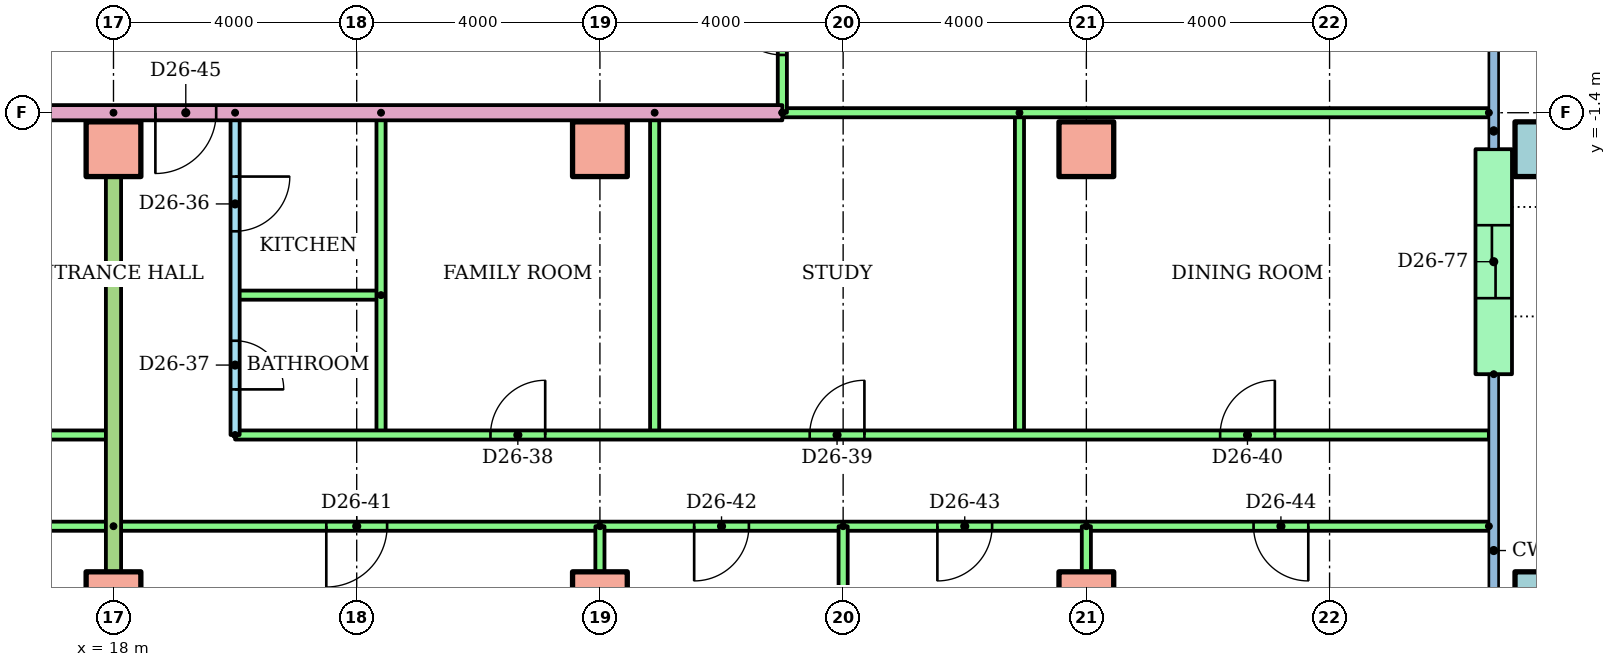
"""IFC4 building model, lengths in metres.
Left out: names, types, materials, properties, quantities, classifications, styles, units other than length and angle.
Written with IfcOpenShell. Run it as: python <this file> out.ifc"""

import sys

from ifc_helpers import new_model, si_unit, direction, frame, frame_2d, origin, origin_2d, place, context, subcontext, project, spatial, rectangle, hollow_rectangle, extrude, element, fill, save


model = new_model("IFC4")
c1 = context("Model", 3, precision=1e-05, world=origin(), true_north=direction((0.0, 1.0)))
c2 = subcontext(c1, "Body", "Model", "MODEL_VIEW")
j1 = project(units=[si_unit("LENGTHUNIT", "METRE"), si_unit("PLANEANGLEUNIT", "RADIAN")], contexts=[c1])
p1 = place(None, origin())
s1 = spatial("IfcSite", under=j1, at=p1, CompositionType="ELEMENT")
p2 = place(p1, origin())
s2 = spatial("IfcBuilding", under=s1, at=p2, CompositionType="ELEMENT")
p3 = place(p2, frame((0.0, 0.0, 99.9)))
s3 = spatial("IfcBuildingStorey", under=s2, at=p3, CompositionType="ELEMENT", Elevation=99.9)
for number, where in (
    (1, (18.0, -9.4, 0.0)),
    (2, (26.0, -9.4, 0.0)),
    (3, (34.0, -9.4, 0.0)),
):
    element("IfcColumn", number, at=place(p3, frame(where)), inside=s3, PredefinedType="COLUMN", context=c2, shape_type="SweptSolid", body=[
        extrude(rectangle(XDim=0.9, YDim=0.9, at=origin_2d()), origin(), (0.0, 0.0, 1.0), 3.2),
    ])
p4 = place(p3, frame((41.5, -9.4, 0.0)))
e4 = element("IfcColumn", 4, at=p4, inside=s3, PredefinedType="COLUMN", context=c2, shape_type="SweptSolid", body=[
    extrude(hollow_rectangle(XDim=0.9, YDim=0.9, WallThickness=0.045, at=origin_2d()), origin(), (0.0, 0.0, 1.0), 3.2),
])
for number, where in (
    (5, (18.0, -2.0, 0.0)),
    (6, (26.0, -2.0, 0.0)),
    (7, (34.0, -2.0, 0.0)),
):
    element("IfcColumn", number, at=place(p3, frame(where)), inside=s3, PredefinedType="COLUMN", context=c2, shape_type="SweptSolid", body=[
        extrude(rectangle(XDim=0.9, YDim=0.9, at=origin_2d()), origin(), (0.0, 0.0, 1.0), 3.2),
    ])
p5 = place(p3, frame((41.5, -2.0, 0.0)))
e8 = element("IfcColumn", 8, at=p5, inside=s3, PredefinedType="COLUMN", context=c2, shape_type="SweptSolid", body=[
    extrude(hollow_rectangle(XDim=0.9, YDim=0.9, WallThickness=0.045, at=origin_2d()), origin(), (0.0, 0.0, 1.0), 3.2),
])
p6 = place(p3, frame((40.7, -5.7, 0.0), z_axis=(0.0, 0.0, 1.0), x_axis=(0.0, 1.0, 0.0)))
e9 = element("IfcWall", 9, at=p6, inside=s3, PredefinedType="STANDARD", context=c2, shape_type="SweptSolid", body=[
    extrude(rectangle(XDim=3.7, YDim=0.6, at=frame_2d((1.85, 0.0))), origin(), (0.0, 0.0, 1.0), 2.92),
])
p7 = place(p6, frame((1.25, 0.0, 0.0)))
e10 = element("IfcOpeningElement", 10, at=p7, cuts=e9, PredefinedType="OPENING", context=c2, shape_type="SweptSolid", body=[
    extrude(rectangle(XDim=1.2, YDim=2.1, at=frame_2d((0.6, 1.05))), frame((0.0, 0.31, 0.0), z_axis=(0.0, -1.0, 0.0), x_axis=(1.0, 0.0, 0.0)), (0.0, 0.0, 1.0), 0.62),
])
p8 = place(p3, frame((-4.0, -6.7, 0.0)))
e11 = element("IfcWall", 11, at=p8, inside=s3, PredefinedType="PARTITIONING", context=c2, shape_type="SweptSolid", body=[
    extrude(rectangle(XDim=22.0, YDim=0.15, at=frame_2d((11.0, 0.0))), origin(), (0.0, 0.0, 1.0), 2.4),
])
p9 = place(p8, frame((4.45, 0.0, 0.0)))
e12 = element("IfcOpeningElement", 12, at=p9, cuts=e11, PredefinedType="OPENING", context=c2, shape_type="SweptSolid", body=[
    extrude(rectangle(XDim=0.9, YDim=2.1, at=frame_2d((0.45, 1.05))), frame((0.0, 0.085, 0.0), z_axis=(0.0, -1.0, 0.0), x_axis=(1.0, 0.0, 0.0)), (0.0, 0.0, 1.0), 0.17),
])
p10 = place(p8, frame((10.2, 0.0, 0.0)))
e13 = element("IfcOpeningElement", 13, at=p10, cuts=e11, PredefinedType="OPENING", context=c2, shape_type="SweptSolid", body=[
    extrude(rectangle(XDim=0.9, YDim=2.1, at=frame_2d((0.45, 1.05))), frame((0.0, 0.085, 0.0), z_axis=(0.0, -1.0, 0.0), x_axis=(1.0, 0.0, 0.0)), (0.0, 0.0, 1.0), 0.17),
])
p11 = place(p8, frame((17.5, 0.0, 0.0)))
e14 = element("IfcOpeningElement", 14, at=p11, cuts=e11, PredefinedType="OPENING", context=c2, shape_type="SweptSolid", body=[
    extrude(rectangle(XDim=0.9, YDim=2.1, at=frame_2d((0.45, 1.05))), frame((0.0, 0.085, 0.0), z_axis=(0.0, -1.0, 0.0), x_axis=(1.0, 0.0, 0.0)), (0.0, 0.0, 1.0), 0.17),
])
p12 = place(p3, frame((18.0, -8.2, 0.0), z_axis=(0.0, 0.0, 1.0), x_axis=(-1.0, 0.0, 0.0)))
e15 = element("IfcWall", 15, at=p12, inside=s3, PredefinedType="PARTITIONING", context=c2, shape_type="SweptSolid", body=[
    extrude(rectangle(XDim=24.0, YDim=0.15, at=frame_2d((12.0, 0.0))), origin(), (0.0, 0.0, 1.0), 2.4),
])
p13 = place(p12, frame((21.55, 0.0, 0.0)))
e16 = element("IfcOpeningElement", 16, at=p13, cuts=e15, PredefinedType="OPENING", context=c2, shape_type="SweptSolid", body=[
    extrude(rectangle(XDim=0.9, YDim=2.1, at=frame_2d((0.45, 1.05))), frame((0.0, 0.085, 0.0), z_axis=(0.0, -1.0, 0.0), x_axis=(1.0, 0.0, 0.0)), (0.0, 0.0, 1.0), 0.17),
])
p14 = place(p12, frame((17.55, 0.0, 0.0)))
e17 = element("IfcOpeningElement", 17, at=p14, cuts=e15, PredefinedType="OPENING", context=c2, shape_type="SweptSolid", body=[
    extrude(rectangle(XDim=0.9, YDim=2.1, at=frame_2d((0.45, 1.05))), frame((0.0, 0.085, 0.0), z_axis=(0.0, -1.0, 0.0), x_axis=(1.0, 0.0, 0.0)), (0.0, 0.0, 1.0), 0.17),
])
p15 = place(p12, frame((13.55, 0.0, 0.0)))
e18 = element("IfcOpeningElement", 18, at=p15, cuts=e15, PredefinedType="OPENING", context=c2, shape_type="SweptSolid", body=[
    extrude(rectangle(XDim=0.9, YDim=2.1, at=frame_2d((0.45, 1.05))), frame((0.0, 0.085, 0.0), z_axis=(0.0, -1.0, 0.0), x_axis=(1.0, 0.0, 0.0)), (0.0, 0.0, 1.0), 0.17),
])
p16 = place(p12, frame((9.55, 0.0, 0.0)))
e19 = element("IfcOpeningElement", 19, at=p16, cuts=e15, PredefinedType="OPENING", context=c2, shape_type="SweptSolid", body=[
    extrude(rectangle(XDim=0.9, YDim=2.1, at=frame_2d((0.45, 1.05))), frame((0.0, 0.085, 0.0), z_axis=(0.0, -1.0, 0.0), x_axis=(1.0, 0.0, 0.0)), (0.0, 0.0, 1.0), 0.17),
])
p17 = place(p12, frame((3.5, 0.0, 0.0)))
e20 = element("IfcOpeningElement", 20, at=p17, cuts=e15, PredefinedType="OPENING", context=c2, shape_type="SweptSolid", body=[
    extrude(rectangle(XDim=1.0, YDim=2.1, at=frame_2d((0.5, 1.05))), frame((0.0, 0.085, 0.0), z_axis=(0.0, -1.0, 0.0), x_axis=(1.0, 0.0, 0.0)), (0.0, 0.0, 1.0), 0.17),
])
p18 = place(p3, frame((20.0, -1.4, 0.0), z_axis=(0.0, 0.0, 1.0), x_axis=(0.0, -1.0, 0.0)))
e21 = element("IfcWall", 21, at=p18, inside=s3, PredefinedType="PARTITIONING", context=c2, shape_type="SweptSolid", body=[
    extrude(rectangle(XDim=5.3, YDim=0.15, at=frame_2d((2.65, 0.0))), origin(), (0.0, 0.0, 1.0), 2.4),
])
p19 = place(p18, frame((1.05, 0.0, 0.0)))
e22 = element("IfcOpeningElement", 22, at=p19, cuts=e21, PredefinedType="OPENING", context=c2, shape_type="SweptSolid", body=[
    extrude(rectangle(XDim=0.9, YDim=2.1, at=frame_2d((0.45, 1.05))), frame((0.0, 0.085, 0.0), z_axis=(0.0, -1.0, 0.0), x_axis=(1.0, 0.0, 0.0)), (0.0, 0.0, 1.0), 0.17),
])
p20 = place(p18, frame((3.75, 0.0, 0.0)))
e23 = element("IfcOpeningElement", 23, at=p20, cuts=e21, PredefinedType="OPENING", context=c2, shape_type="SweptSolid", body=[
    extrude(rectangle(XDim=0.8, YDim=2.1, at=frame_2d((0.4, 1.05))), frame((0.0, 0.085, 0.0), z_axis=(0.0, -1.0, 0.0), x_axis=(1.0, 0.0, 0.0)), (0.0, 0.0, 1.0), 0.17),
])
p21 = place(p3, frame((22.4, -4.4, 0.0), z_axis=(0.0, 0.0, 1.0), x_axis=(-1.0, 0.0, 0.0)))
e24 = element("IfcWall", 24, at=p21, inside=s3, PredefinedType="PARTITIONING", context=c2, shape_type="SweptSolid", body=[
    extrude(rectangle(XDim=2.4, YDim=0.15, at=frame_2d((1.2, 0.0))), origin(), (0.0, 0.0, 1.0), 2.4),
])
for number, where, z_axis, x_axis in (
    (25, (22.4, -1.4, 0.0), (0.0, 0.0, 1.0), (0.0, -1.0, 0.0)),
    (26, (26.9, -1.4, 0.0), (0.0, 0.0, 1.0), (0.0, -1.0, 0.0)),
    (27, (32.9, -1.4, 0.0), (0.0, 0.0, 1.0), (0.0, -1.0, 0.0)),
):
    element("IfcWall", number, at=place(p3, frame(where, z_axis=z_axis, x_axis=x_axis)), inside=s3, PredefinedType="PARTITIONING", context=c2, shape_type="SweptSolid", body=[
        extrude(rectangle(XDim=5.3, YDim=0.15, at=frame_2d((2.65, 0.0))), origin(), (0.0, 0.0, 1.0), 2.4),
    ])
p22 = place(p3, frame((20.0, -6.7, 0.0)))
e28 = element("IfcWall", 28, at=p22, inside=s3, PredefinedType="PARTITIONING", context=c2, shape_type="SweptSolid", body=[
    extrude(rectangle(XDim=20.62, YDim=0.15, at=frame_2d((10.31, 0.0))), origin(), (0.0, 0.0, 1.0), 2.4),
])
p23 = place(p22, frame((4.2, 0.0, 0.0)))
e29 = element("IfcOpeningElement", 29, at=p23, cuts=e28, PredefinedType="OPENING", context=c2, shape_type="SweptSolid", body=[
    extrude(rectangle(XDim=0.9, YDim=2.1, at=frame_2d((0.45, 1.05))), frame((0.0, 0.085, 0.0), z_axis=(0.0, -1.0, 0.0), x_axis=(1.0, 0.0, 0.0)), (0.0, 0.0, 1.0), 0.17),
])
p24 = place(p22, frame((9.45, 0.0, 0.0)))
e30 = element("IfcOpeningElement", 30, at=p24, cuts=e28, PredefinedType="OPENING", context=c2, shape_type="SweptSolid", body=[
    extrude(rectangle(XDim=0.9, YDim=2.1, at=frame_2d((0.45, 1.05))), frame((0.0, 0.085, 0.0), z_axis=(0.0, -1.0, 0.0), x_axis=(1.0, 0.0, 0.0)), (0.0, 0.0, 1.0), 0.17),
])
p25 = place(p22, frame((16.2, 0.0, 0.0)))
e31 = element("IfcOpeningElement", 31, at=p25, cuts=e28, PredefinedType="OPENING", context=c2, shape_type="SweptSolid", body=[
    extrude(rectangle(XDim=0.9, YDim=2.1, at=frame_2d((0.45, 1.05))), frame((0.0, 0.085, 0.0), z_axis=(0.0, -1.0, 0.0), x_axis=(1.0, 0.0, 0.0)), (0.0, 0.0, 1.0), 0.17),
])
p26 = place(p3, frame((40.62, -8.2, 0.0), z_axis=(0.0, 0.0, 1.0), x_axis=(-1.0, 0.0, 0.0)))
e32 = element("IfcWall", 32, at=p26, inside=s3, PredefinedType="PARTITIONING", context=c2, shape_type="SweptSolid", body=[
    extrude(rectangle(XDim=22.62, YDim=0.15, at=frame_2d((11.31, 0.0))), origin(), (0.0, 0.0, 1.0), 2.4),
])
p27 = place(p26, frame((18.12, 0.0, 0.0)))
e33 = element("IfcOpeningElement", 33, at=p27, cuts=e32, PredefinedType="OPENING", context=c2, shape_type="SweptSolid", body=[
    extrude(rectangle(XDim=1.0, YDim=2.1, at=frame_2d((0.5, 1.05))), frame((0.0, 0.085, 0.0), z_axis=(0.0, -1.0, 0.0), x_axis=(1.0, 0.0, 0.0)), (0.0, 0.0, 1.0), 0.17),
])
p28 = place(p26, frame((12.17, 0.0, 0.0)))
e34 = element("IfcOpeningElement", 34, at=p28, cuts=e32, PredefinedType="OPENING", context=c2, shape_type="SweptSolid", body=[
    extrude(rectangle(XDim=0.9, YDim=2.1, at=frame_2d((0.45, 1.05))), frame((0.0, 0.085, 0.0), z_axis=(0.0, -1.0, 0.0), x_axis=(1.0, 0.0, 0.0)), (0.0, 0.0, 1.0), 0.17),
])
p29 = place(p26, frame((8.17, 0.0, 0.0)))
e35 = element("IfcOpeningElement", 35, at=p29, cuts=e32, PredefinedType="OPENING", context=c2, shape_type="SweptSolid", body=[
    extrude(rectangle(XDim=0.9, YDim=2.1, at=frame_2d((0.45, 1.05))), frame((0.0, 0.085, 0.0), z_axis=(0.0, -1.0, 0.0), x_axis=(1.0, 0.0, 0.0)), (0.0, 0.0, 1.0), 0.17),
])
p30 = place(p26, frame((2.97, 0.0, 0.0)))
e36 = element("IfcOpeningElement", 36, at=p30, cuts=e32, PredefinedType="OPENING", context=c2, shape_type="SweptSolid", body=[
    extrude(rectangle(XDim=0.9, YDim=2.1, at=frame_2d((0.45, 1.05))), frame((0.0, 0.085, 0.0), z_axis=(0.0, -1.0, 0.0), x_axis=(1.0, 0.0, 0.0)), (0.0, 0.0, 1.0), 0.17),
])
p31 = place(p3, frame((26.0, -8.2, 0.0), z_axis=(0.0, 0.0, 1.0), x_axis=(0.0, -1.0, 0.0)))
e37 = element("IfcWall", 37, at=p31, inside=s3, PredefinedType="PARTITIONING", context=c2, shape_type="SweptSolid", body=[
    extrude(rectangle(XDim=8.01, YDim=0.15, at=frame_2d((4.005, 0.0))), origin(), (0.0, 0.0, 1.0), 2.4),
])
p32 = place(p3, frame((30.0, -8.2, 0.0), z_axis=(0.0, 0.0, 1.0), x_axis=(0.0, -1.0, 0.0)))
e38 = element("IfcWall", 38, at=p32, inside=s3, PredefinedType="PARTITIONING", context=c2, shape_type="SweptSolid", body=[
    extrude(rectangle(XDim=8.021, YDim=0.15, at=frame_2d((4.01, 0.0))), origin(), (0.0, 0.0, 1.0), 2.4),
])
p33 = place(p3, frame((34.0, -8.2, 0.0), z_axis=(0.0, 0.0, 1.0), x_axis=(0.0, -1.0, 0.0)))
e39 = element("IfcWall", 39, at=p33, inside=s3, PredefinedType="PARTITIONING", context=c2, shape_type="SweptSolid", body=[
    extrude(rectangle(XDim=8.01, YDim=0.15, at=frame_2d((4.005, 0.0))), origin(), (0.0, 0.0, 1.0), 2.4),
])
p34 = place(p3, frame((18.0, -1.4, 0.0), z_axis=(0.0, 0.0, 1.0), x_axis=(0.0, -1.0, 0.0)))
e40 = element("IfcWall", 40, at=p34, inside=s3, PredefinedType="PARTITIONING", context=c2, shape_type="SweptSolid", body=[
    extrude(rectangle(XDim=14.81, YDim=0.25, at=frame_2d((7.405, 0.0))), origin(), (0.0, 0.0, 1.0), 2.4),
])
p35 = place(p3, frame((29.0, -1.4, 0.0), z_axis=(0.0, 0.0, 1.0), x_axis=(-1.0, 0.0, 0.0)))
e41 = element("IfcWall", 41, at=p35, inside=s3, PredefinedType="PARTITIONING", context=c2, shape_type="SweptSolid", body=[
    extrude(rectangle(XDim=15.0, YDim=0.25, at=frame_2d((7.5, 0.0))), origin(), (0.0, 0.0, 1.0), 2.4),
])
p36 = place(p35, frame((9.311, 0.0, 0.0)))
e42 = element("IfcOpeningElement", 42, at=p36, cuts=e41, PredefinedType="OPENING", context=c2, shape_type="SweptSolid", body=[
    extrude(rectangle(XDim=1.0, YDim=2.1, at=frame_2d((0.5, 1.05))), frame((0.0, 0.135, 0.0), z_axis=(0.0, -1.0, 0.0), x_axis=(1.0, 0.0, 0.0)), (0.0, 0.0, 1.0), 0.27),
])
p37 = place(p3, frame((40.62, -1.4, 0.0), z_axis=(0.0, 0.0, 1.0), x_axis=(-1.0, 0.0, 0.0)))
e43 = element("IfcWall", 43, at=p37, inside=s3, PredefinedType="PARTITIONING", context=c2, shape_type="SweptSolid", body=[
    extrude(rectangle(XDim=11.62, YDim=0.15, at=frame_2d((5.81, 0.0))), origin(), (0.0, 0.0, 1.0), 2.4),
])
p38 = place(p3, frame((29.0, -1.4, 0.0), z_axis=(0.0, 0.0, 1.0), x_axis=(0.0, 1.0, 0.0)))
e44 = element("IfcWall", 44, at=p38, inside=s3, PredefinedType="PARTITIONING", context=c2, shape_type="SweptSolid", body=[
    extrude(rectangle(XDim=2.8, YDim=0.15, at=frame_2d((1.4, 0.0))), origin(), (0.0, 0.0, 1.0), 2.4),
])
p39 = place(p38, frame((0.95, 0.0, 0.0)))
e45 = element("IfcOpeningElement", 45, at=p39, cuts=e44, PredefinedType="OPENING", context=c2, shape_type="SweptSolid", body=[
    extrude(rectangle(XDim=0.9, YDim=2.1, at=frame_2d((0.45, 1.05))), frame((0.0, 0.085, 0.0), z_axis=(0.0, -1.0, 0.0), x_axis=(1.0, 0.0, 0.0)), (0.0, 0.0, 1.0), 0.17),
])
p40 = place(p19, origin())
e46 = element("IfcDoor", 46, at=p40, inside=s3, OperationType="SINGLE_SWING_LEFT", PredefinedType="DOOR", context=c2, shape_type="SweptSolid", body=[
    extrude(rectangle(XDim=0.9, YDim=2.1, at=frame_2d((0.45, 1.05))), frame((0.0, 0.025, 0.0), z_axis=(0.0, -1.0, 0.0), x_axis=(1.0, 0.0, 0.0)), (0.0, 0.0, 1.0), 0.05),
])
fill(e22, e46)
p41 = place(p20, origin())
e47 = element("IfcDoor", 47, at=p41, inside=s3, OperationType="SINGLE_SWING_RIGHT", PredefinedType="DOOR", context=c2, shape_type="SweptSolid", body=[
    extrude(rectangle(XDim=0.8, YDim=2.1, at=frame_2d((0.4, 1.05))), frame((0.0, 0.025, 0.0), z_axis=(0.0, -1.0, 0.0), x_axis=(1.0, 0.0, 0.0)), (0.0, 0.0, 1.0), 0.05),
])
fill(e23, e47)
p42 = place(p23, origin())
e48 = element("IfcDoor", 48, at=p42, inside=s3, OperationType="SINGLE_SWING_RIGHT", PredefinedType="DOOR", context=c2, shape_type="SweptSolid", body=[
    extrude(rectangle(XDim=0.9, YDim=2.1, at=frame_2d((0.45, 1.05))), frame((0.0, 0.025, 0.0), z_axis=(0.0, -1.0, 0.0), x_axis=(1.0, 0.0, 0.0)), (0.0, 0.0, 1.0), 0.05),
])
fill(e29, e48)
p43 = place(p24, origin())
e49 = element("IfcDoor", 49, at=p43, inside=s3, OperationType="SINGLE_SWING_RIGHT", PredefinedType="DOOR", context=c2, shape_type="SweptSolid", body=[
    extrude(rectangle(XDim=0.9, YDim=2.1, at=frame_2d((0.45, 1.05))), frame((0.0, 0.025, 0.0), z_axis=(0.0, -1.0, 0.0), x_axis=(1.0, 0.0, 0.0)), (0.0, 0.0, 1.0), 0.05),
])
fill(e30, e49)
p44 = place(p25, origin())
e50 = element("IfcDoor", 50, at=p44, inside=s3, OperationType="SINGLE_SWING_RIGHT", PredefinedType="DOOR", context=c2, shape_type="SweptSolid", body=[
    extrude(rectangle(XDim=0.9, YDim=2.1, at=frame_2d((0.45, 1.05))), frame((0.0, 0.025, 0.0), z_axis=(0.0, -1.0, 0.0), x_axis=(1.0, 0.0, 0.0)), (0.0, 0.0, 1.0), 0.05),
])
fill(e31, e50)
p45 = place(p27, origin())
e51 = element("IfcDoor", 51, at=p45, inside=s3, OperationType="SINGLE_SWING_RIGHT", PredefinedType="DOOR", context=c2, shape_type="SweptSolid", body=[
    extrude(rectangle(XDim=1.0, YDim=2.1, at=frame_2d((0.5, 1.05))), frame((0.0, 0.025, 0.0), z_axis=(0.0, -1.0, 0.0), x_axis=(1.0, 0.0, 0.0)), (0.0, 0.0, 1.0), 0.05),
])
fill(e33, e51)
p46 = place(p28, origin())
e52 = element("IfcDoor", 52, at=p46, inside=s3, OperationType="SINGLE_SWING_RIGHT", PredefinedType="DOOR", context=c2, shape_type="SweptSolid", body=[
    extrude(rectangle(XDim=0.9, YDim=2.1, at=frame_2d((0.45, 1.05))), frame((0.0, 0.025, 0.0), z_axis=(0.0, -1.0, 0.0), x_axis=(1.0, 0.0, 0.0)), (0.0, 0.0, 1.0), 0.05),
])
fill(e34, e52)
p47 = place(p29, origin())
e53 = element("IfcDoor", 53, at=p47, inside=s3, OperationType="SINGLE_SWING_RIGHT", PredefinedType="DOOR", context=c2, shape_type="SweptSolid", body=[
    extrude(rectangle(XDim=0.9, YDim=2.1, at=frame_2d((0.45, 1.05))), frame((0.0, 0.025, 0.0), z_axis=(0.0, -1.0, 0.0), x_axis=(1.0, 0.0, 0.0)), (0.0, 0.0, 1.0), 0.05),
])
fill(e35, e53)
p48 = place(p30, origin())
e54 = element("IfcDoor", 54, at=p48, inside=s3, OperationType="SINGLE_SWING_LEFT", PredefinedType="DOOR", context=c2, shape_type="SweptSolid", body=[
    extrude(rectangle(XDim=0.9, YDim=2.1, at=frame_2d((0.45, 1.05))), frame((0.0, 0.025, 0.0), z_axis=(0.0, -1.0, 0.0), x_axis=(1.0, 0.0, 0.0)), (0.0, 0.0, 1.0), 0.05),
])
fill(e36, e54)
p49 = place(p36, origin())
e55 = element("IfcDoor", 55, at=p49, inside=s3, OperationType="SINGLE_SWING_RIGHT", PredefinedType="DOOR", context=c2, shape_type="SweptSolid", body=[
    extrude(rectangle(XDim=1.0, YDim=2.1, at=frame_2d((0.5, 1.05))), frame((0.0, 0.025, 0.0), z_axis=(0.0, -1.0, 0.0), x_axis=(1.0, 0.0, 0.0)), (0.0, 0.0, 1.0), 0.05),
])
fill(e42, e55)
p50 = place(p39, origin())
e56 = element("IfcDoor", 56, at=p50, inside=s3, OperationType="SINGLE_SWING_RIGHT", PredefinedType="DOOR", context=c2, shape_type="SweptSolid", body=[
    extrude(rectangle(XDim=0.9, YDim=2.1, at=frame_2d((0.45, 1.05))), frame((0.0, 0.025, 0.0), z_axis=(0.0, -1.0, 0.0), x_axis=(1.0, 0.0, 0.0)), (0.0, 0.0, 1.0), 0.05),
])
fill(e45, e56)
p51 = place(p7, origin())
e57 = element("IfcDoor", 57, at=p51, inside=s3, OperationType="SLIDING_TO_LEFT", PredefinedType="DOOR", context=c2, shape_type="SweptSolid", body=[
    extrude(rectangle(XDim=1.2, YDim=2.1, at=frame_2d((0.6, 1.05))), frame((0.0, 0.025, 0.0), z_axis=(0.0, -1.0, 0.0), x_axis=(1.0, 0.0, 0.0)), (0.0, 0.0, 1.0), 0.05),
])
fill(e10, e57)
save(model, sys.argv[1])
